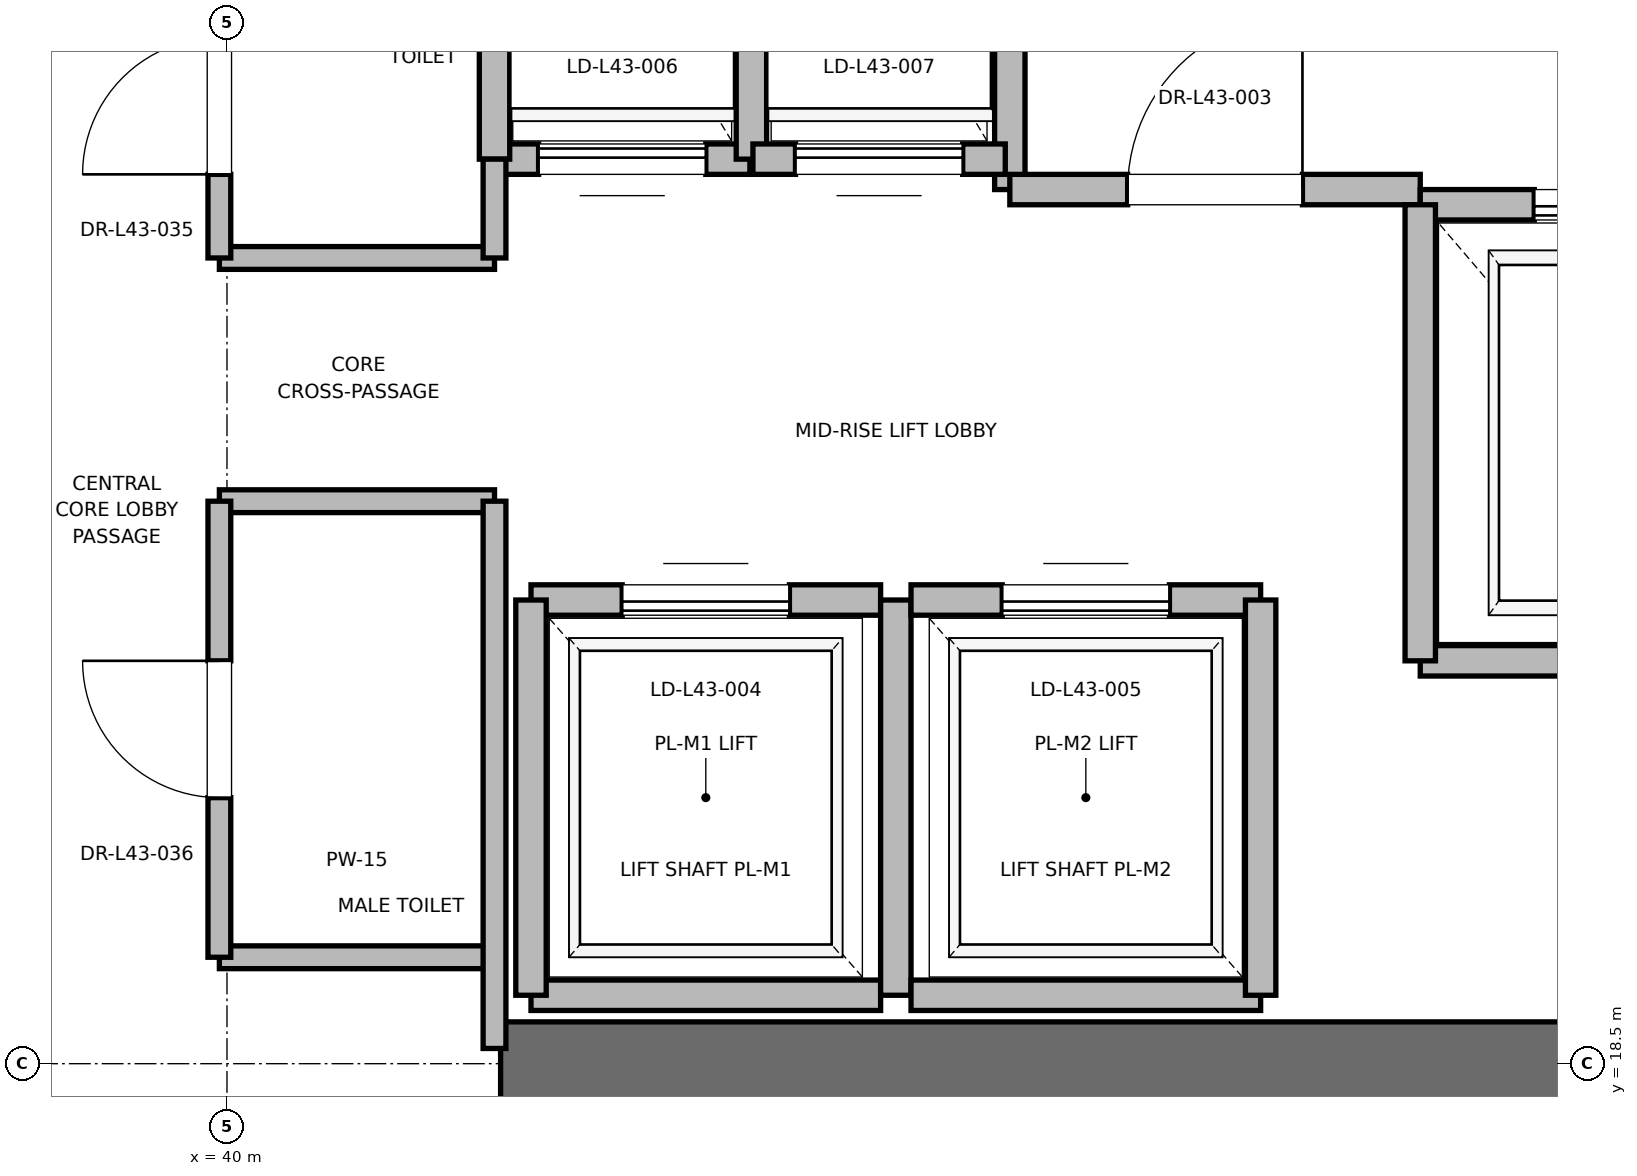
"""IFC4 building model, lengths in metres.
Left out: names, types, materials, properties, quantities, classifications, styles, units other than length and angle.
Written with IfcOpenShell. Run it as: python <this file> out.ifc"""

import sys

from ifc_helpers import new_model, si_unit, direction, frame, frame_2d, origin, place, context, subcontext, project, spatial, rectangle, extrude, element, fill, save


model = new_model("IFC4")
c1 = context("Model", 3, precision=1e-05, world=origin(), true_north=direction((0.0, 1.0)))
c2 = subcontext(c1, "Body", "Model", "MODEL_VIEW")
j1 = project(units=[si_unit("LENGTHUNIT", "METRE"), si_unit("PLANEANGLEUNIT", "RADIAN")], contexts=[c1])
p1 = place(None, origin())
s1 = spatial("IfcSite", under=j1, at=p1, CompositionType="ELEMENT")
p2 = place(p1, origin())
s2 = spatial("IfcBuilding", under=s1, at=p2, CompositionType="ELEMENT")
p3 = place(p2, frame((0.0, 0.0, 184.4)))
s3 = spatial("IfcBuildingStorey", under=s2, at=p3, CompositionType="ELEMENT", Elevation=184.4)
p4 = place(p3, frame((41.8, 18.5, 0.0), z_axis=(0.0, 0.0, 1.0), x_axis=(1.0, 0.0, 0.0)))
e1 = element("IfcWall", 1, at=p4, inside=s3, PredefinedType="SHEAR", context=c2, shape_type="SweptSolid", body=[
    extrude(rectangle(XDim=9.2, YDim=0.55, at=frame_2d((4.6, 0.0))), origin(), (0.0, 0.0, 1.0), 4.7),
])
p5 = place(p3, frame((45.15, 24.25, 0.0), z_axis=(0.0, 0.0, 1.0), x_axis=(0.0, 1.0, 0.0)))
e2 = element("IfcWall", 2, at=p5, inside=s3, PredefinedType="PARTITIONING", context=c2, shape_type="SweptSolid", body=[
    extrude(rectangle(XDim=3.37, YDim=0.2, at=frame_2d((1.685, 0.0))), origin(), (0.0, 0.0, 1.0), 4.7),
])
p6 = place(p3, frame((45.15, 24.25, 0.0), z_axis=(0.0, 0.0, 1.0), x_axis=(1.0, 0.0, 0.0)))
e3 = element("IfcWall", 3, at=p6, inside=s3, PredefinedType="PARTITIONING", context=c2, shape_type="SweptSolid", body=[
    extrude(rectangle(XDim=2.7, YDim=0.2, at=frame_2d((1.35, 0.0))), origin(), (0.0, 0.0, 1.0), 4.7),
])
p7 = place(p6, frame((0.775, 0.0, 0.0)))
e4 = element("IfcOpeningElement", 4, at=p7, cuts=e3, PredefinedType="OPENING", context=c2, shape_type="SweptSolid", body=[
    extrude(rectangle(XDim=1.15, YDim=2.2, at=frame_2d((0.575, 1.1))), frame((0.0, 0.1, 0.0), z_axis=(0.0, -1.0, 0.0), x_axis=(1.0, 0.0, 0.0)), (0.0, 0.0, 1.0), 0.2),
])
p8 = place(p3, frame((47.85, 21.15, 0.0), z_axis=(0.0, 0.0, 1.0), x_axis=(1.0, 0.0, 0.0)))
e5 = element("IfcWall", 5, at=p8, inside=s3, PredefinedType="SOLIDWALL", context=c2, shape_type="SweptSolid", body=[
    extrude(rectangle(XDim=2.6, YDim=0.2, at=frame_2d((1.3, 0.0))), origin(), (0.0, 0.0, 1.0), 4.7),
])
p9 = place(p3, frame((50.45, 24.15, 0.0), z_axis=(0.0, 0.0, 1.0), x_axis=(-1.0, 0.0, 0.0)))
e6 = element("IfcWall", 6, at=p9, inside=s3, PredefinedType="SOLIDWALL", context=c2, shape_type="SweptSolid", body=[
    extrude(rectangle(XDim=2.6, YDim=0.2, at=frame_2d((1.3, 0.0))), origin(), (0.0, 0.0, 1.0), 3.68),
])
p10 = place(p9, frame((0.75, 0.0, 0.0)))
e7 = element("IfcOpeningElement", 7, at=p10, cuts=e6, PredefinedType="OPENING", context=c2, shape_type="SweptSolid", body=[
    extrude(rectangle(XDim=1.1, YDim=2.2, at=frame_2d((0.55, 1.1))), frame((0.0, 0.1, 0.0), z_axis=(0.0, -1.0, 0.0), x_axis=(1.0, 0.0, 0.0)), (0.0, 0.0, 1.0), 0.2),
])
p11 = place(p3, frame((47.85, 24.15, 0.0), z_axis=(0.0, 0.0, 1.0), x_axis=(0.0, -1.0, 0.0)))
e8 = element("IfcWall", 8, at=p11, inside=s3, PredefinedType="SOLIDWALL", context=c2, shape_type="SweptSolid", body=[
    extrude(rectangle(XDim=3.0, YDim=0.2, at=frame_2d((1.5, 0.0))), origin(), (0.0, 0.0, 1.0), 4.7),
])
p12 = place(p3, frame((42.0, 18.95, 0.0), z_axis=(0.0, 0.0, 1.0), x_axis=(1.0, 0.0, 0.0)))
e9 = element("IfcWall", 9, at=p12, inside=s3, PredefinedType="SOLIDWALL", context=c2, shape_type="SweptSolid", body=[
    extrude(rectangle(XDim=2.3, YDim=0.2, at=frame_2d((1.15, 0.0))), origin(), (0.0, 0.0, 1.0), 3.68),
])
p13 = place(p3, frame((44.3, 21.55, 0.0), z_axis=(0.0, 0.0, 1.0), x_axis=(-1.0, 0.0, 0.0)))
e10 = element("IfcWall", 10, at=p13, inside=s3, PredefinedType="SOLIDWALL", context=c2, shape_type="SweptSolid", body=[
    extrude(rectangle(XDim=2.3, YDim=0.2, at=frame_2d((1.15, 0.0))), origin(), (0.0, 0.0, 1.0), 4.7),
])
p14 = place(p13, frame((0.6, 0.0, 0.0)))
e11 = element("IfcOpeningElement", 11, at=p14, cuts=e10, PredefinedType="OPENING", context=c2, shape_type="SweptSolid", body=[
    extrude(rectangle(XDim=1.1, YDim=2.2, at=frame_2d((0.55, 1.1))), frame((0.0, 0.1, 0.0), z_axis=(0.0, -1.0, 0.0), x_axis=(1.0, 0.0, 0.0)), (0.0, 0.0, 1.0), 0.2),
])
p15 = place(p3, frame((42.0, 21.55, 0.0), z_axis=(0.0, 0.0, 1.0), x_axis=(0.0, -1.0, 0.0)))
e12 = element("IfcWall", 12, at=p15, inside=s3, PredefinedType="SOLIDWALL", context=c2, shape_type="SweptSolid", body=[
    extrude(rectangle(XDim=2.6, YDim=0.2, at=frame_2d((1.3, 0.0))), origin(), (0.0, 0.0, 1.0), 3.68),
])
p16 = place(p3, frame((44.4, 18.95, 0.0), z_axis=(0.0, 0.0, 1.0), x_axis=(0.0, 1.0, 0.0)))
e13 = element("IfcWall", 13, at=p16, inside=s3, PredefinedType="SOLIDWALL", context=c2, shape_type="SweptSolid", body=[
    extrude(rectangle(XDim=2.6, YDim=0.2, at=frame_2d((1.3, 0.0))), origin(), (0.0, 0.0, 1.0), 4.7),
])
p17 = place(p3, frame((44.5, 18.95, 0.0), z_axis=(0.0, 0.0, 1.0), x_axis=(1.0, 0.0, 0.0)))
e14 = element("IfcWall", 14, at=p17, inside=s3, PredefinedType="SOLIDWALL", context=c2, shape_type="SweptSolid", body=[
    extrude(rectangle(XDim=2.3, YDim=0.2, at=frame_2d((1.15, 0.0))), origin(), (0.0, 0.0, 1.0), 4.7),
])
p18 = place(p3, frame((46.8, 21.55, 0.0), z_axis=(0.0, 0.0, 1.0), x_axis=(-1.0, 0.0, 0.0)))
e15 = element("IfcWall", 15, at=p18, inside=s3, PredefinedType="SOLIDWALL", context=c2, shape_type="SweptSolid", body=[
    extrude(rectangle(XDim=2.3, YDim=0.2, at=frame_2d((1.15, 0.0))), origin(), (0.0, 0.0, 1.0), 4.7),
])
p19 = place(p18, frame((0.6, 0.0, 0.0)))
e16 = element("IfcOpeningElement", 16, at=p19, cuts=e15, PredefinedType="OPENING", context=c2, shape_type="SweptSolid", body=[
    extrude(rectangle(XDim=1.1, YDim=2.2, at=frame_2d((0.55, 1.1))), frame((0.0, 0.1, 0.0), z_axis=(0.0, -1.0, 0.0), x_axis=(1.0, 0.0, 0.0)), (0.0, 0.0, 1.0), 0.2),
])
p20 = place(p3, frame((46.8, 18.95, 0.0), z_axis=(0.0, 0.0, 1.0), x_axis=(0.0, 1.0, 0.0)))
e17 = element("IfcWall", 17, at=p20, inside=s3, PredefinedType="SOLIDWALL", context=c2, shape_type="SweptSolid", body=[
    extrude(rectangle(XDim=2.6, YDim=0.2, at=frame_2d((1.3, 0.0))), origin(), (0.0, 0.0, 1.0), 4.7),
])
p21 = place(p3, frame((41.76, 24.45, 0.0), z_axis=(0.0, 0.0, 1.0), x_axis=(1.0, 0.0, 0.0)))
e18 = element("IfcWall", 18, at=p21, inside=s3, PredefinedType="SOLIDWALL", context=c2, shape_type="SweptSolid", body=[
    extrude(rectangle(XDim=1.68, YDim=0.2, at=frame_2d((0.84, 0.0))), origin(), (0.0, 0.0, 1.0), 4.7),
])
p22 = place(p21, frame((0.29, 0.0, 0.0)))
e19 = element("IfcOpeningElement", 19, at=p22, cuts=e18, PredefinedType="OPENING", context=c2, shape_type="SweptSolid", body=[
    extrude(rectangle(XDim=1.1, YDim=2.2, at=frame_2d((0.55, 1.1))), frame((0.0, 0.1, 0.0), z_axis=(0.0, -1.0, 0.0), x_axis=(1.0, 0.0, 0.0)), (0.0, 0.0, 1.0), 0.2),
])
for number, where, z_axis, x_axis in (
    (20, (41.76, 27.05, 0.0), (0.0, 0.0, 1.0), (0.0, -1.0, 0.0)),
    (21, (43.45, 24.45, 0.0), (0.0, 0.0, 1.0), (0.0, 1.0, 0.0)),
):
    element("IfcWall", number, at=place(p3, frame(where, z_axis=z_axis, x_axis=x_axis)), inside=s3, PredefinedType="SOLIDWALL", context=c2, shape_type="SweptSolid", body=[
        extrude(rectangle(XDim=2.6, YDim=0.2, at=frame_2d((1.3, 0.0))), origin(), (0.0, 0.0, 1.0), 4.7),
    ])
p23 = place(p3, frame((43.46, 24.45, 0.0), z_axis=(0.0, 0.0, 1.0), x_axis=(1.0, 0.0, 0.0)))
e22 = element("IfcWall", 22, at=p23, inside=s3, PredefinedType="SOLIDWALL", context=c2, shape_type="SweptSolid", body=[
    extrude(rectangle(XDim=1.66, YDim=0.2, at=frame_2d((0.83, 0.0))), origin(), (0.0, 0.0, 1.0), 4.7),
])
p24 = place(p23, frame((0.28, 0.0, 0.0)))
e23 = element("IfcOpeningElement", 23, at=p24, cuts=e22, PredefinedType="OPENING", context=c2, shape_type="SweptSolid", body=[
    extrude(rectangle(XDim=1.1, YDim=2.2, at=frame_2d((0.55, 1.1))), frame((0.0, 0.1, 0.0), z_axis=(0.0, -1.0, 0.0), x_axis=(1.0, 0.0, 0.0)), (0.0, 0.0, 1.0), 0.2),
])
for number, where, z_axis, x_axis in (
    (24, (39.95, 19.2, 0.0), (0.0, 0.0, 1.0), (1.0, 0.0, 0.0)),
    (25, (39.95, 22.2, 0.0), (0.0, 0.0, 1.0), (1.0, 0.0, 0.0)),
    (26, (39.95, 23.8, 0.0), (0.0, 0.0, 1.0), (1.0, 0.0, 0.0)),
):
    element("IfcWall", number, at=place(p3, frame(where, z_axis=z_axis, x_axis=x_axis)), inside=s3, PredefinedType="PARTITIONING", context=c2, shape_type="SweptSolid", body=[
        extrude(rectangle(XDim=1.81, YDim=0.15, at=frame_2d((0.905, 0.0))), origin(), (0.0, 0.0, 1.0), 2.85),
    ])
p25 = place(p3, frame((41.76, 18.6, 0.0), z_axis=(0.0, 0.0, 1.0), x_axis=(0.0, 1.0, 0.0)))
e27 = element("IfcWall", 27, at=p25, inside=s3, PredefinedType="PARTITIONING", context=c2, shape_type="SweptSolid", body=[
    extrude(rectangle(XDim=3.6, YDim=0.15, at=frame_2d((1.8, 0.0))), origin(), (0.0, 0.0, 1.0), 2.85),
])
p26 = place(p3, frame((41.76, 23.8, 0.0), z_axis=(0.0, 0.0, 1.0), x_axis=(0.0, 1.0, 0.0)))
e28 = element("IfcWall", 28, at=p26, inside=s3, PredefinedType="PARTITIONING", context=c2, shape_type="SweptSolid", body=[
    extrude(rectangle(XDim=0.65, YDim=0.15, at=frame_2d((0.325, 0.0))), origin(), (0.0, 0.0, 1.0), 2.85),
])
p27 = place(p3, frame((39.95, 19.2, 0.0), z_axis=(0.0, 0.0, 1.0), x_axis=(0.0, 1.0, 0.0)))
e29 = element("IfcWall", 29, at=p27, inside=s3, PredefinedType="PARTITIONING", context=c2, shape_type="SweptSolid", body=[
    extrude(rectangle(XDim=3.0, YDim=0.15, at=frame_2d((1.5, 0.0))), origin(), (0.0, 0.0, 1.0), 2.85),
])
p28 = place(p27, frame((1.05, 0.0, 0.0)))
e30 = element("IfcOpeningElement", 30, at=p28, cuts=e29, PredefinedType="OPENING", context=c2, shape_type="SweptSolid", body=[
    extrude(rectangle(XDim=0.9, YDim=2.1, at=frame_2d((0.45, 1.05))), frame((0.0, 0.075, 0.0), z_axis=(0.0, -1.0, 0.0), x_axis=(1.0, 0.0, 0.0)), (0.0, 0.0, 1.0), 0.15),
])
p29 = place(p3, frame((39.95, 23.8, 0.0), z_axis=(0.0, 0.0, 1.0), x_axis=(0.0, 1.0, 0.0)))
e31 = element("IfcWall", 31, at=p29, inside=s3, PredefinedType="PARTITIONING", context=c2, shape_type="SweptSolid", body=[
    extrude(rectangle(XDim=2.0, YDim=0.15, at=frame_2d((1.0, 0.0))), origin(), (0.0, 0.0, 1.0), 2.85),
])
p30 = place(p29, frame((0.55, 0.0, 0.0)))
e32 = element("IfcOpeningElement", 32, at=p30, cuts=e31, PredefinedType="OPENING", context=c2, shape_type="SweptSolid", body=[
    extrude(rectangle(XDim=0.9, YDim=2.1, at=frame_2d((0.45, 1.05))), frame((0.0, 0.075, 0.0), z_axis=(0.0, -1.0, 0.0), x_axis=(1.0, 0.0, 0.0)), (0.0, 0.0, 1.0), 0.15),
])
p31 = place(p7, origin())
e33 = element("IfcDoor", 33, at=p31, inside=s3, OperationType="SINGLE_SWING_RIGHT", PredefinedType="DOOR", context=c2, shape_type="SweptSolid", body=[
    extrude(rectangle(XDim=1.15, YDim=2.2, at=frame_2d((0.575, 1.1))), frame((0.0, 0.025, 0.0), z_axis=(0.0, -1.0, 0.0), x_axis=(1.0, 0.0, 0.0)), (0.0, 0.0, 1.0), 0.05),
])
fill(e4, e33)
p32 = place(p10, origin())
e34 = element("IfcDoor", 34, at=p32, inside=s3, OperationType="SLIDING_TO_RIGHT", PredefinedType="DOOR", context=c2, shape_type="SweptSolid", body=[
    extrude(rectangle(XDim=1.1, YDim=2.2, at=frame_2d((0.55, 1.1))), frame((0.0, 0.025, 0.0), z_axis=(0.0, -1.0, 0.0), x_axis=(1.0, 0.0, 0.0)), (0.0, 0.0, 1.0), 0.05),
])
fill(e7, e34)
p33 = place(p14, origin())
e35 = element("IfcDoor", 35, at=p33, inside=s3, OperationType="SLIDING_TO_RIGHT", PredefinedType="DOOR", context=c2, shape_type="SweptSolid", body=[
    extrude(rectangle(XDim=1.1, YDim=2.2, at=frame_2d((0.55, 1.1))), frame((0.0, 0.025, 0.0), z_axis=(0.0, -1.0, 0.0), x_axis=(1.0, 0.0, 0.0)), (0.0, 0.0, 1.0), 0.05),
])
fill(e11, e35)
p34 = place(p19, origin())
e36 = element("IfcDoor", 36, at=p34, inside=s3, OperationType="SLIDING_TO_RIGHT", PredefinedType="DOOR", context=c2, shape_type="SweptSolid", body=[
    extrude(rectangle(XDim=1.1, YDim=2.2, at=frame_2d((0.55, 1.1))), frame((0.0, 0.025, 0.0), z_axis=(0.0, -1.0, 0.0), x_axis=(1.0, 0.0, 0.0)), (0.0, 0.0, 1.0), 0.05),
])
fill(e16, e36)
p35 = place(p22, origin())
e37 = element("IfcDoor", 37, at=p35, inside=s3, OperationType="SLIDING_TO_RIGHT", PredefinedType="DOOR", context=c2, shape_type="SweptSolid", body=[
    extrude(rectangle(XDim=1.1, YDim=2.2, at=frame_2d((0.55, 1.1))), frame((0.0, 0.025, 0.0), z_axis=(0.0, -1.0, 0.0), x_axis=(1.0, 0.0, 0.0)), (0.0, 0.0, 1.0), 0.05),
])
fill(e19, e37)
p36 = place(p24, origin())
e38 = element("IfcDoor", 38, at=p36, inside=s3, OperationType="SLIDING_TO_RIGHT", PredefinedType="DOOR", context=c2, shape_type="SweptSolid", body=[
    extrude(rectangle(XDim=1.1, YDim=2.2, at=frame_2d((0.55, 1.1))), frame((0.0, 0.025, 0.0), z_axis=(0.0, -1.0, 0.0), x_axis=(1.0, 0.0, 0.0)), (0.0, 0.0, 1.0), 0.05),
])
fill(e23, e38)
p37 = place(p28, origin())
e39 = element("IfcDoor", 39, at=p37, inside=s3, OperationType="SINGLE_SWING_RIGHT", PredefinedType="DOOR", context=c2, shape_type="SweptSolid", body=[
    extrude(rectangle(XDim=0.9, YDim=2.1, at=frame_2d((0.45, 1.05))), frame((0.0, 0.025, 0.0), z_axis=(0.0, -1.0, 0.0), x_axis=(1.0, 0.0, 0.0)), (0.0, 0.0, 1.0), 0.05),
])
fill(e30, e39)
p38 = place(p30, origin())
e40 = element("IfcDoor", 40, at=p38, inside=s3, OperationType="SINGLE_SWING_LEFT", PredefinedType="DOOR", context=c2, shape_type="SweptSolid", body=[
    extrude(rectangle(XDim=0.9, YDim=2.1, at=frame_2d((0.45, 1.05))), frame((0.0, 0.025, 0.0), z_axis=(0.0, -1.0, 0.0), x_axis=(1.0, 0.0, 0.0)), (0.0, 0.0, 1.0), 0.05),
])
fill(e32, e40)
save(model, sys.argv[1])
